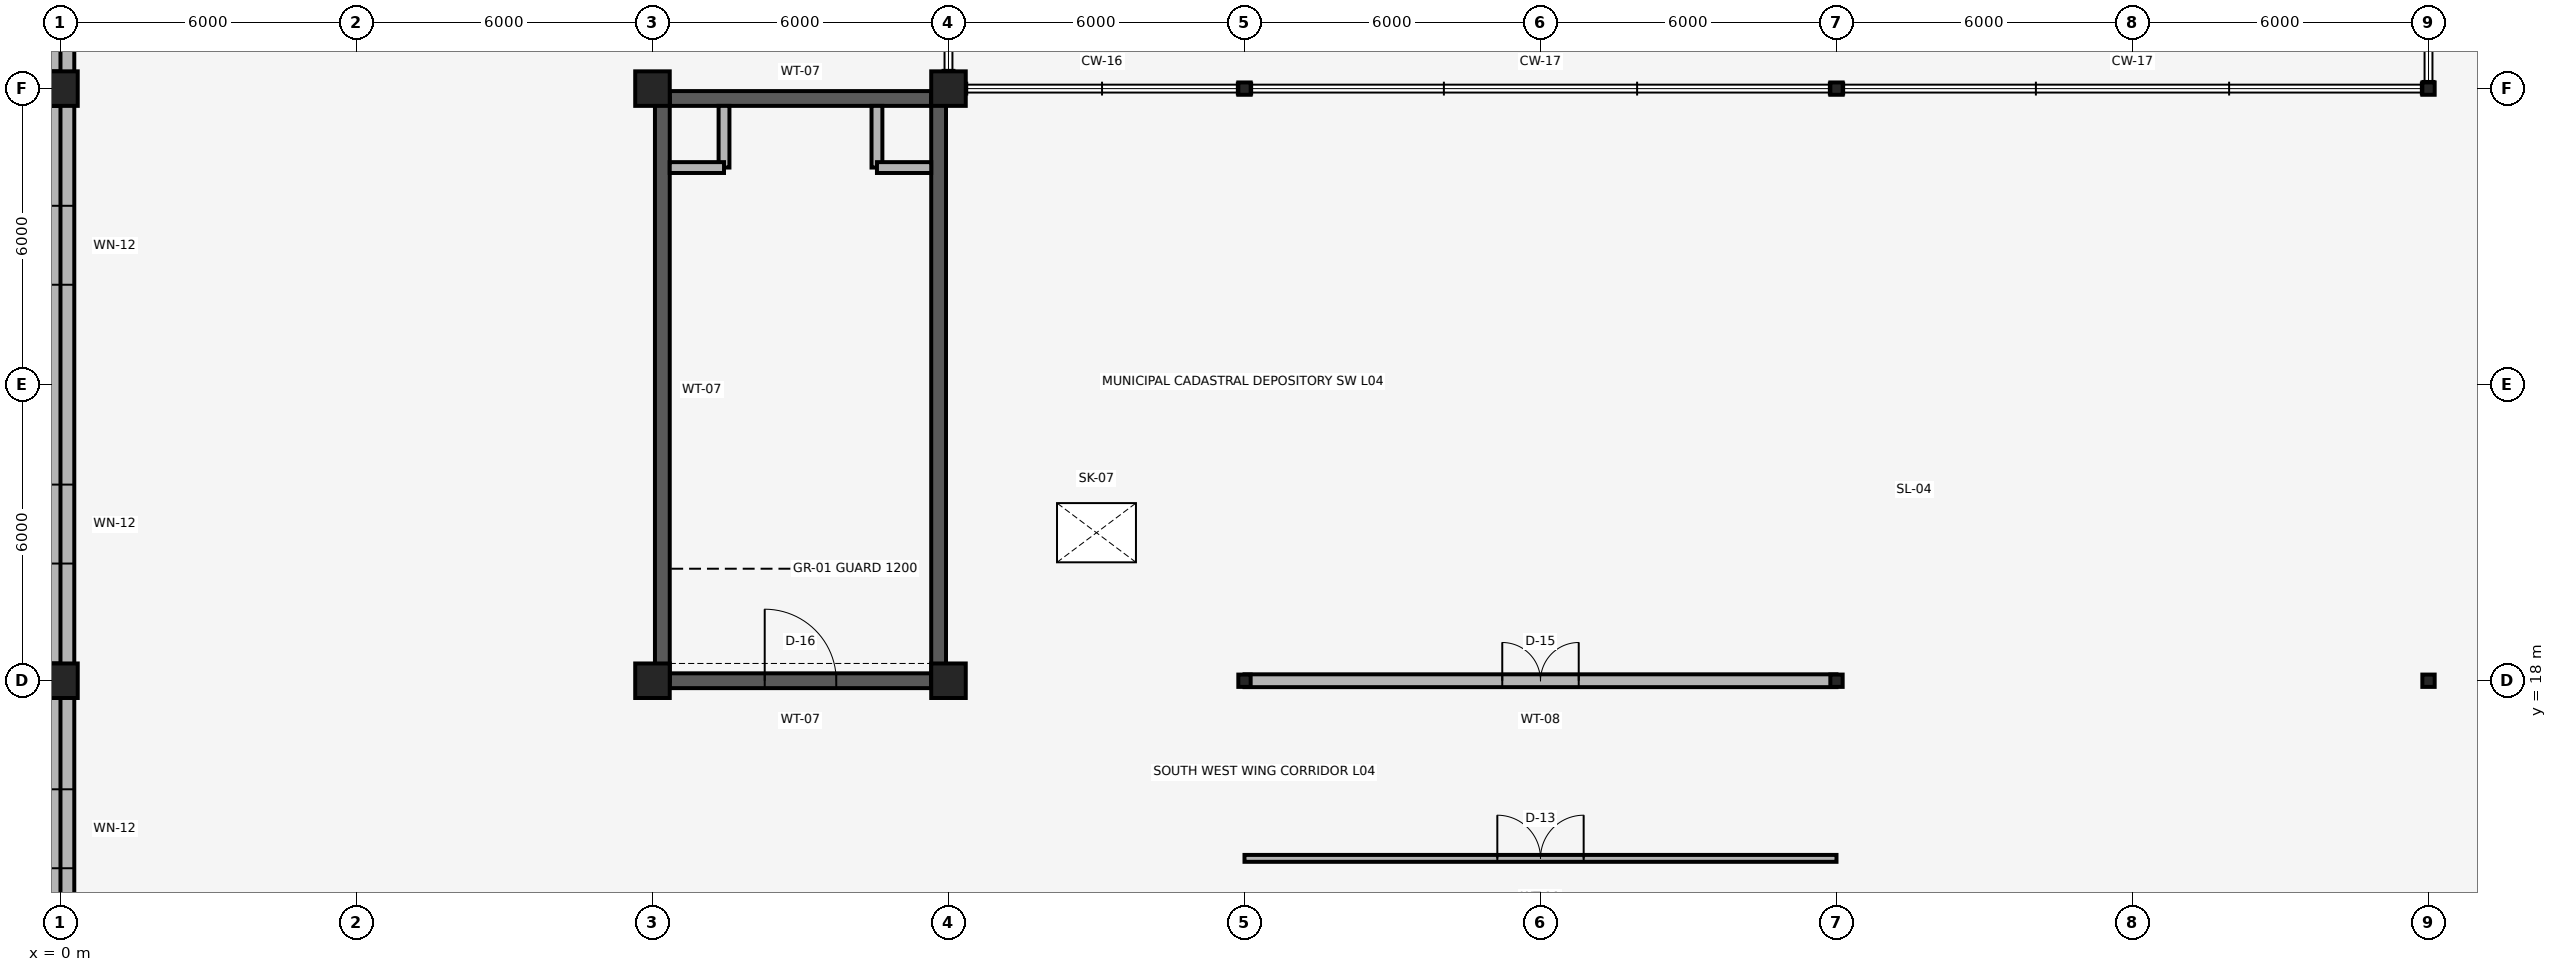
"""IFC4 building model, lengths in metres.
Left out: names, types, materials, properties, quantities, classifications, styles, units other than length and angle.
Written with IfcOpenShell. Run it as: python <this file> out.ifc"""

import sys

from ifc_helpers import new_model, si_unit, direction, frame, frame_2d, origin, origin_2d, place, context, subcontext, project, spatial, rectangle, i_section, extrude, element, fill, save


model = new_model("IFC4")
c1 = context("Model", 3, precision=1e-05, world=origin(), true_north=direction((0.0, 1.0)))
c2 = subcontext(c1, "Body", "Model", "MODEL_VIEW")
j1 = project(units=[si_unit("LENGTHUNIT", "METRE"), si_unit("PLANEANGLEUNIT", "RADIAN")], contexts=[c1])
p1 = place(None, origin())
s1 = spatial("IfcSite", under=j1, at=p1, CompositionType="ELEMENT")
p2 = place(p1, origin())
s2 = spatial("IfcBuilding", under=s1, at=p2, CompositionType="ELEMENT")
p3 = place(p2, frame((0.0, 0.0, 16.5)))
s3 = spatial("IfcBuildingStorey", under=s2, at=p3, CompositionType="ELEMENT", Elevation=16.5)
for number, where, z_axis, x_axis in (
    (1, (0.0, 18.0, 0.0), (0.0, 0.0, 1.0), (1.0, 0.0, 0.0)),
    (2, (12.0, 18.0, 0.0), (0.0, 0.0, 1.0), (1.0, 0.0, 0.0)),
    (3, (18.0, 18.0, 0.0), (0.0, 0.0, 1.0), (1.0, 0.0, 0.0)),
):
    element("IfcColumn", number, at=place(p3, frame(where, z_axis=z_axis, x_axis=x_axis)), inside=s3, PredefinedType="COLUMN", context=c2, shape_type="SweptSolid", body=[
        extrude(rectangle(XDim=0.7, YDim=0.7, at=origin_2d()), origin(), (0.0, 0.0, 1.0), 4.0),
    ])
for number, where, z_axis, x_axis in (
    (4, (24.0, 18.0, 0.0), (0.0, 0.0, 1.0), (1.0, 0.0, 0.0)),
    (5, (36.0, 18.0, 0.0), (0.0, 0.0, 1.0), (1.0, 0.0, 0.0)),
    (6, (48.0, 18.0, 0.0), (0.0, 0.0, 1.0), (1.0, 0.0, 0.0)),
):
    element("IfcColumn", number, at=place(p3, frame(where, z_axis=z_axis, x_axis=x_axis)), inside=s3, PredefinedType="COLUMN", context=c2, shape_type="SweptSolid", body=[
        extrude(i_section(OverallWidth=0.25, OverallDepth=0.25, WebThickness=0.009, FlangeThickness=0.014, FilletRadius=0.016, at=origin_2d()), origin(), (0.0, 0.0, 1.0), 4.0),
    ])
for number, where, z_axis, x_axis in (
    (7, (0.0, 30.0, 0.0), (0.0, 0.0, 1.0), (1.0, 0.0, 0.0)),
    (8, (12.0, 30.0, 0.0), (0.0, 0.0, 1.0), (1.0, 0.0, 0.0)),
    (9, (18.0, 30.0, 0.0), (0.0, 0.0, 1.0), (1.0, 0.0, 0.0)),
):
    element("IfcColumn", number, at=place(p3, frame(where, z_axis=z_axis, x_axis=x_axis)), inside=s3, PredefinedType="COLUMN", context=c2, shape_type="SweptSolid", body=[
        extrude(rectangle(XDim=0.7, YDim=0.7, at=origin_2d()), origin(), (0.0, 0.0, 1.0), 4.0),
    ])
for number, where, z_axis, x_axis in (
    (10, (24.0, 30.0, 0.0), (0.0, 0.0, 1.0), (1.0, 0.0, 0.0)),
    (11, (36.0, 30.0, 0.0), (0.0, 0.0, 1.0), (1.0, 0.0, 0.0)),
    (12, (48.0, 30.0, 0.0), (0.0, 0.0, 1.0), (1.0, 0.0, 0.0)),
):
    element("IfcColumn", number, at=place(p3, frame(where, z_axis=z_axis, x_axis=x_axis)), inside=s3, PredefinedType="COLUMN", context=c2, shape_type="SweptSolid", body=[
        extrude(i_section(OverallWidth=0.25, OverallDepth=0.25, WebThickness=0.009, FlangeThickness=0.014, FilletRadius=0.016, at=origin_2d()), origin(), (0.0, 0.0, 1.0), 4.0),
    ])
p4 = place(p3, frame((0.0, 12.35, 0.0), z_axis=(0.0, 0.0, 1.0), x_axis=(0.0, 1.0, 0.0)))
e13 = element("IfcWall", 13, at=p4, inside=s3, PredefinedType="SOLIDWALL", context=c2, shape_type="SweptSolid", body=[
    extrude(rectangle(XDim=5.3, YDim=0.54, at=frame_2d((2.65, 0.0))), origin(), (0.0, 0.0, 1.0), 3.55),
])
p5 = place(p4, frame((1.85, 0.0, 0.85)))
e14 = element("IfcOpeningElement", 14, at=p5, cuts=e13, PredefinedType="OPENING", context=c2, shape_type="SweptSolid", body=[
    extrude(rectangle(XDim=1.6, YDim=2.2, at=frame_2d((0.8, 1.1))), frame((0.0, 0.285, 0.0), z_axis=(0.0, -1.0, 0.0), x_axis=(1.0, 0.0, 0.0)), (0.0, 0.0, 1.0), 0.57),
])
p6 = place(p3, frame((0.0, 18.35, 0.0), z_axis=(0.0, 0.0, 1.0), x_axis=(0.0, 1.0, 0.0)))
e15 = element("IfcWall", 15, at=p6, inside=s3, PredefinedType="SOLIDWALL", context=c2, shape_type="SweptSolid", body=[
    extrude(rectangle(XDim=11.3, YDim=0.54, at=frame_2d((5.65, 0.0))), origin(), (0.0, 0.0, 1.0), 3.55),
])
p7 = place(p6, frame((2.025, 0.0, 0.85)))
e16 = element("IfcOpeningElement", 16, at=p7, cuts=e15, PredefinedType="OPENING", context=c2, shape_type="SweptSolid", body=[
    extrude(rectangle(XDim=1.6, YDim=2.2, at=frame_2d((0.8, 1.1))), frame((0.0, 0.285, 0.0), z_axis=(0.0, -1.0, 0.0), x_axis=(1.0, 0.0, 0.0)), (0.0, 0.0, 1.0), 0.57),
])
p8 = place(p6, frame((7.675, 0.0, 0.85)))
e17 = element("IfcOpeningElement", 17, at=p8, cuts=e15, PredefinedType="OPENING", context=c2, shape_type="SweptSolid", body=[
    extrude(rectangle(XDim=1.6, YDim=2.2, at=frame_2d((0.8, 1.1))), frame((0.0, 0.285, 0.0), z_axis=(0.0, -1.0, 0.0), x_axis=(1.0, 0.0, 0.0)), (0.0, 0.0, 1.0), 0.57),
])
p9 = place(p3, frame((0.0, 30.35, 0.0), z_axis=(0.0, 0.0, 1.0), x_axis=(0.0, 1.0, 0.0)))
e18 = element("IfcWall", 18, at=p9, inside=s3, PredefinedType="SOLIDWALL", context=c2, shape_type="SweptSolid", body=[
    extrude(rectangle(XDim=5.3, YDim=0.54, at=frame_2d((2.65, 0.0))), origin(), (0.0, 0.0, 1.0), 3.55),
])
p10 = place(p9, frame((1.85, 0.0, 0.85)))
e19 = element("IfcOpeningElement", 19, at=p10, cuts=e18, PredefinedType="OPENING", context=c2, shape_type="SweptSolid", body=[
    extrude(rectangle(XDim=1.6, YDim=2.2, at=frame_2d((0.8, 1.1))), frame((0.0, 0.285, 0.0), z_axis=(0.0, -1.0, 0.0), x_axis=(1.0, 0.0, 0.0)), (0.0, 0.0, 1.0), 0.57),
])
p11 = place(p3, frame((0.14, 12.0, 4.2), z_axis=(0.0, 0.0, 1.0), x_axis=(0.0, 1.0, 0.0)))
e20 = element("IfcWall", 20, at=p11, inside=s3, PredefinedType="PARAPET", context=c2, shape_type="SweptSolid", body=[
    extrude(rectangle(XDim=90.0, YDim=0.28, at=frame_2d((45.0, 0.0))), origin(), (0.0, 0.0, 1.0), 0.85),
])
p12 = place(p3, frame((12.35, 18.0, 0.0), z_axis=(0.0, 0.0, 1.0), x_axis=(1.0, 0.0, 0.0)))
e21 = element("IfcWall", 21, at=p12, inside=s3, PredefinedType="SHEAR", context=c2, shape_type="SweptSolid", body=[
    extrude(rectangle(XDim=5.3, YDim=0.3, at=frame_2d((2.65, 0.0))), origin(), (0.0, 0.0, 1.0), 4.0),
])
p13 = place(p12, frame((1.925, 0.0, 0.0)))
e22 = element("IfcOpeningElement", 22, at=p13, cuts=e21, PredefinedType="OPENING", context=c2, shape_type="SweptSolid", body=[
    extrude(rectangle(XDim=1.45, YDim=2.25, at=frame_2d((0.725, 1.125))), frame((0.0, 0.165, 0.0), z_axis=(0.0, -1.0, 0.0), x_axis=(1.0, 0.0, 0.0)), (0.0, 0.0, 1.0), 0.33),
])
p14 = place(p3, frame((12.35, 29.8, 0.0), z_axis=(0.0, 0.0, 1.0), x_axis=(1.0, 0.0, 0.0)))
e23 = element("IfcWall", 23, at=p14, inside=s3, PredefinedType="SHEAR", context=c2, shape_type="SweptSolid", body=[
    extrude(rectangle(XDim=5.3, YDim=0.3, at=frame_2d((2.65, 0.0))), origin(), (0.0, 0.0, 1.0), 4.0),
])
for number, where, z_axis, x_axis in (
    (24, (12.2, 18.0, 0.0), (0.0, 0.0, 1.0), (0.0, 1.0, 0.0)),
    (25, (17.8, 18.0, 0.0), (0.0, 0.0, 1.0), (0.0, 1.0, 0.0)),
):
    element("IfcWall", number, at=place(p3, frame(where, z_axis=z_axis, x_axis=x_axis)), inside=s3, PredefinedType="SHEAR", context=c2, shape_type="SweptSolid", body=[
        extrude(rectangle(XDim=11.8, YDim=0.3, at=frame_2d((5.9, 0.0))), origin(), (0.0, 0.0, 1.0), 4.0),
    ])
p15 = place(p3, frame((13.45, 28.4, 0.0), z_axis=(0.0, 0.0, 1.0), x_axis=(0.0, 1.0, 0.0)))
e26 = element("IfcWall", 26, at=p15, inside=s3, PredefinedType="PARTITIONING", context=c2, shape_type="SweptSolid", body=[
    extrude(rectangle(XDim=1.25, YDim=0.22, at=frame_2d((0.625, 0.0))), origin(), (0.0, 0.0, 1.0), 4.0),
])
p16 = place(p3, frame((12.35, 28.4, 0.0), z_axis=(0.0, 0.0, 1.0), x_axis=(1.0, 0.0, 0.0)))
e27 = element("IfcWall", 27, at=p16, inside=s3, PredefinedType="PARTITIONING", context=c2, shape_type="SweptSolid", body=[
    extrude(rectangle(XDim=1.1, YDim=0.22, at=frame_2d((0.55, 0.0))), origin(), (0.0, 0.0, 1.0), 4.0),
])
p17 = place(p3, frame((16.55, 28.4, 0.0), z_axis=(0.0, 0.0, 1.0), x_axis=(0.0, 1.0, 0.0)))
e28 = element("IfcWall", 28, at=p17, inside=s3, PredefinedType="PARTITIONING", context=c2, shape_type="SweptSolid", body=[
    extrude(rectangle(XDim=1.25, YDim=0.22, at=frame_2d((0.625, 0.0))), origin(), (0.0, 0.0, 1.0), 4.0),
])
p18 = place(p3, frame((16.55, 28.4, 0.0), z_axis=(0.0, 0.0, 1.0), x_axis=(1.0, 0.0, 0.0)))
e29 = element("IfcWall", 29, at=p18, inside=s3, PredefinedType="PARTITIONING", context=c2, shape_type="SweptSolid", body=[
    extrude(rectangle(XDim=1.1, YDim=0.22, at=frame_2d((0.55, 0.0))), origin(), (0.0, 0.0, 1.0), 4.0),
])
p19 = place(p3, frame((24.0, 14.4, 0.0), z_axis=(0.0, 0.0, 1.0), x_axis=(1.0, 0.0, 0.0)))
e30 = element("IfcWall", 30, at=p19, inside=s3, PredefinedType="PARTITIONING", context=c2, shape_type="SweptSolid", body=[
    extrude(rectangle(XDim=12.0, YDim=0.14, at=frame_2d((6.0, 0.0))), origin(), (0.0, 0.0, 1.0), 4.0),
])
p20 = place(p19, frame((5.125, 0.0, 0.0)))
e31 = element("IfcOpeningElement", 31, at=p20, cuts=e30, PredefinedType="OPENING", context=c2, shape_type="SweptSolid", body=[
    extrude(rectangle(XDim=1.75, YDim=2.55, at=frame_2d((0.875, 1.275))), frame((0.0, 0.085, 0.0), z_axis=(0.0, -1.0, 0.0), x_axis=(1.0, 0.0, 0.0)), (0.0, 0.0, 1.0), 0.17),
])
p21 = place(p3, frame((24.0, 18.0, 0.0), z_axis=(0.0, 0.0, 1.0), x_axis=(1.0, 0.0, 0.0)))
e32 = element("IfcWall", 32, at=p21, inside=s3, PredefinedType="PARTITIONING", context=c2, shape_type="SweptSolid", body=[
    extrude(rectangle(XDim=12.0, YDim=0.26, at=frame_2d((6.0, 0.0))), origin(), (0.0, 0.0, 1.0), 3.513),
])
p22 = place(p21, frame((5.225, 0.0, 0.0)))
e33 = element("IfcOpeningElement", 33, at=p22, cuts=e32, PredefinedType="OPENING", context=c2, shape_type="SweptSolid", body=[
    extrude(rectangle(XDim=1.55, YDim=2.3, at=frame_2d((0.775, 1.15))), frame((0.0, 0.145, 0.0), z_axis=(0.0, -1.0, 0.0), x_axis=(1.0, 0.0, 0.0)), (0.0, 0.0, 1.0), 0.29),
])
p23 = place(p5, origin())
e34 = element("IfcWindow", 34, at=p23, inside=s3, PartitioningType="SINGLE_PANEL", PredefinedType="WINDOW", context=c2, shape_type="SweptSolid", body=[
    extrude(rectangle(XDim=1.6, YDim=2.2, at=frame_2d((0.8, 1.1))), frame((0.0, 0.03, 0.0), z_axis=(0.0, -1.0, 0.0), x_axis=(1.0, 0.0, 0.0)), (0.0, 0.0, 1.0), 0.06),
])
fill(e14, e34)
p24 = place(p7, origin())
e35 = element("IfcWindow", 35, at=p24, inside=s3, PartitioningType="SINGLE_PANEL", PredefinedType="WINDOW", context=c2, shape_type="SweptSolid", body=[
    extrude(rectangle(XDim=1.6, YDim=2.2, at=frame_2d((0.8, 1.1))), frame((0.0, 0.03, 0.0), z_axis=(0.0, -1.0, 0.0), x_axis=(1.0, 0.0, 0.0)), (0.0, 0.0, 1.0), 0.06),
])
fill(e16, e35)
p25 = place(p8, origin())
e36 = element("IfcWindow", 36, at=p25, inside=s3, PartitioningType="SINGLE_PANEL", PredefinedType="WINDOW", context=c2, shape_type="SweptSolid", body=[
    extrude(rectangle(XDim=1.6, YDim=2.2, at=frame_2d((0.8, 1.1))), frame((0.0, 0.03, 0.0), z_axis=(0.0, -1.0, 0.0), x_axis=(1.0, 0.0, 0.0)), (0.0, 0.0, 1.0), 0.06),
])
fill(e17, e36)
p26 = place(p3, frame((0.0, 0.0, 4.0)))
p27 = place(p26, frame((21.0, 21.0, 0.0)))
p28 = place(p27, frame((0.0, 0.0, 0.15)))
e37 = element("IfcWindow", 37, at=p28, inside=s3, PartitioningType="SINGLE_PANEL", PredefinedType="SKYLIGHT", context=c2, shape_type="SweptSolid", body=[
    extrude(rectangle(XDim=1.6, YDim=1.2, at=origin_2d()), origin(), (0.0, 0.0, 1.0), 0.05),
])
p29 = place(p13, origin())
e38 = element("IfcDoor", 38, at=p29, inside=s3, OperationType="SINGLE_SWING_LEFT", PredefinedType="DOOR", context=c2, shape_type="SweptSolid", body=[
    extrude(rectangle(XDim=1.45, YDim=2.25, at=frame_2d((0.725, 1.125))), frame((0.0, 0.025, 0.0), z_axis=(0.0, -1.0, 0.0), x_axis=(1.0, 0.0, 0.0)), (0.0, 0.0, 1.0), 0.05),
])
fill(e22, e38)
p30 = place(p20, origin())
e39 = element("IfcDoor", 39, at=p30, inside=s3, OperationType="DOUBLE_DOOR_SINGLE_SWING", PredefinedType="DOOR", context=c2, shape_type="SweptSolid", body=[
    extrude(rectangle(XDim=1.75, YDim=2.55, at=frame_2d((0.875, 1.275))), frame((0.0, 0.025, 0.0), z_axis=(0.0, -1.0, 0.0), x_axis=(1.0, 0.0, 0.0)), (0.0, 0.0, 1.0), 0.05),
])
fill(e31, e39)
p31 = place(p22, origin())
e40 = element("IfcDoor", 40, at=p31, inside=s3, OperationType="DOUBLE_DOOR_SINGLE_SWING", PredefinedType="DOOR", context=c2, shape_type="SweptSolid", body=[
    extrude(rectangle(XDim=1.55, YDim=2.3, at=frame_2d((0.775, 1.15))), frame((0.0, 0.025, 0.0), z_axis=(0.0, -1.0, 0.0), x_axis=(1.0, 0.0, 0.0)), (0.0, 0.0, 1.0), 0.05),
])
fill(e33, e40)
save(model, sys.argv[1])
